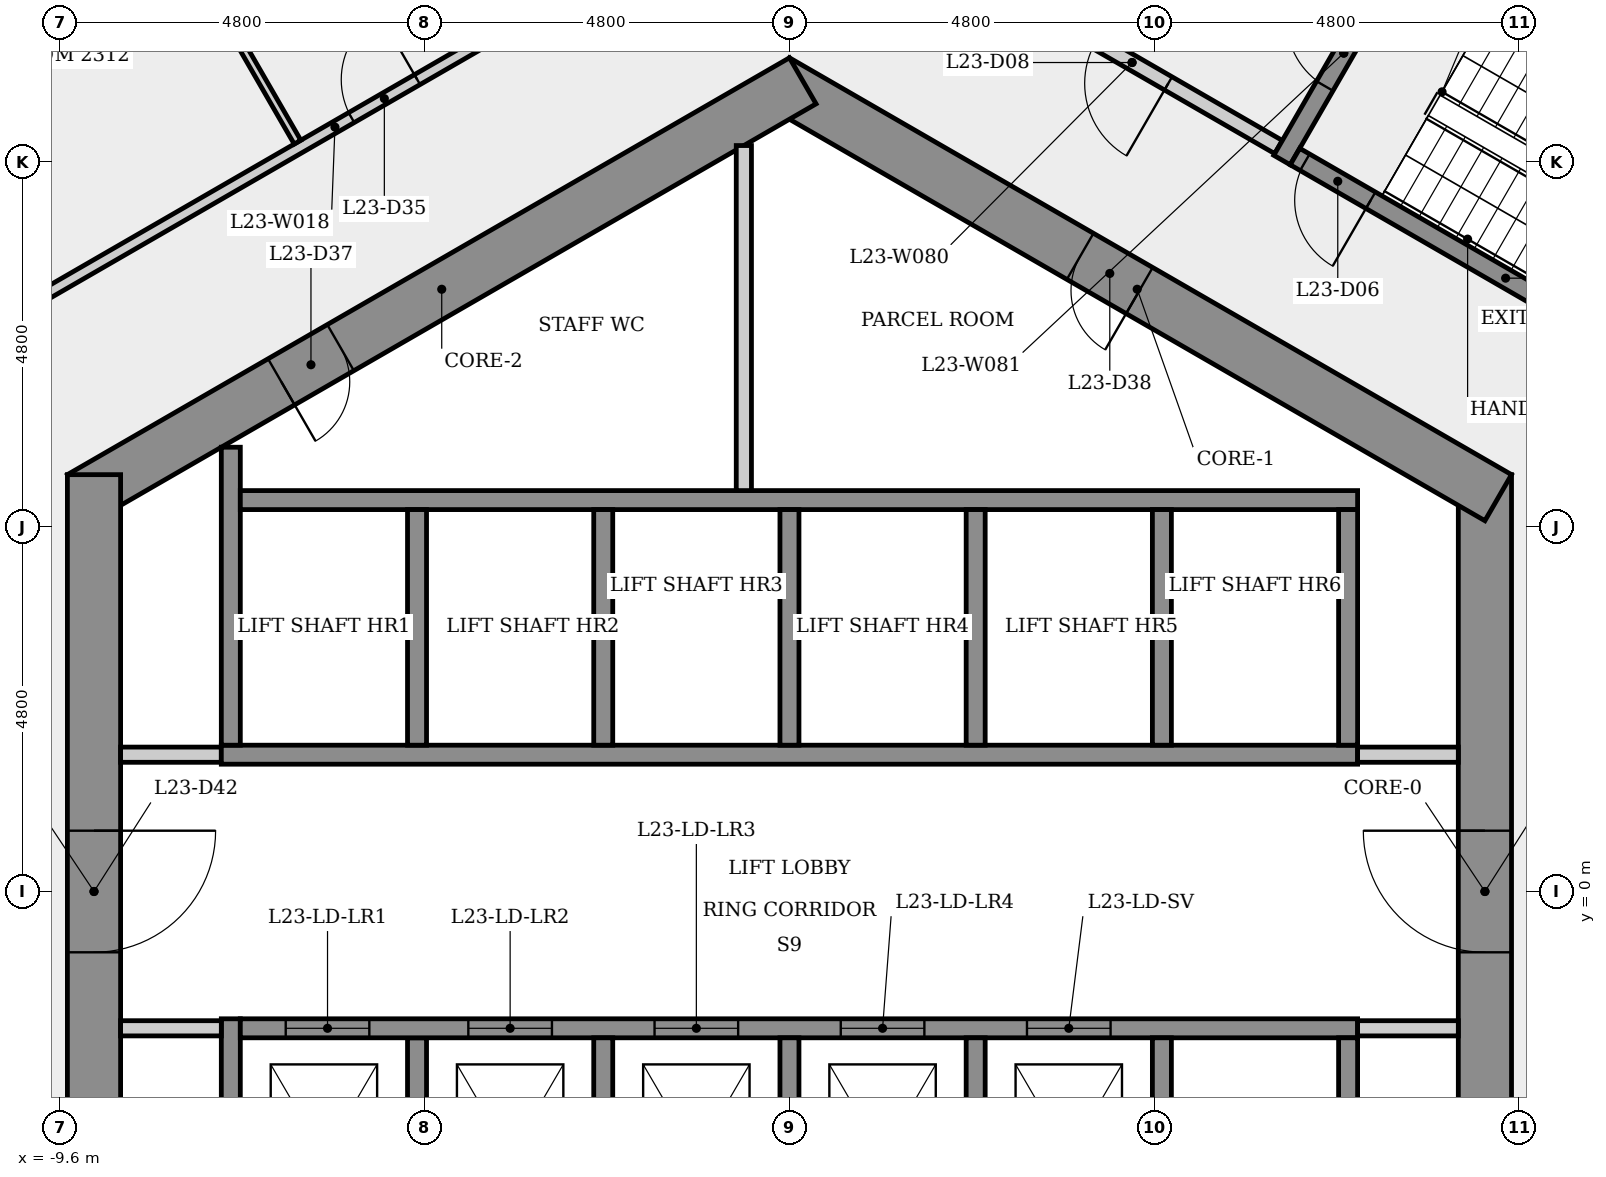
"""IFC4 building model, lengths in metres.
Left out: names, types, materials, properties, quantities, classifications, styles, units other than length and angle.
Written with IfcOpenShell. Run it as: python <this file> out.ifc"""

import sys

from ifc_helpers import new_model, si_unit, direction, frame, frame_2d, origin, place, context, subcontext, project, spatial, rectangle, extrude, element, fill, save


model = new_model("IFC4")
c1 = context("Model", 3, precision=1e-05, world=origin(), true_north=direction((0.0, 1.0)))
c2 = subcontext(c1, "Body", "Model", "MODEL_VIEW")
j1 = project(units=[si_unit("LENGTHUNIT", "METRE"), si_unit("PLANEANGLEUNIT", "RADIAN")], contexts=[c1])
p1 = place(None, origin())
s1 = spatial("IfcSite", under=j1, at=p1, CompositionType="ELEMENT")
p2 = place(p1, origin())
s2 = spatial("IfcBuilding", under=s1, at=p2, CompositionType="ELEMENT")
p3 = place(p2, frame((0.0, 0.0, 89.9)))
s3 = spatial("IfcBuildingStorey", under=s2, at=p3, CompositionType="ELEMENT", Elevation=89.9)
p4 = place(p3, frame((9.15, -5.485, 0.0), z_axis=(0.0, 0.0, 1.0), x_axis=(0.0, 1.0, 0.0)))
e1 = element("IfcWall", 1, at=p4, inside=s3, PredefinedType="SHEAR", context=c2, shape_type="SweptSolid", body=[
    extrude(rectangle(XDim=10.97, YDim=0.7, at=frame_2d((5.485, 0.0))), origin(), (0.0, 0.0, 1.0), 3.4),
])
p5 = place(p4, frame((4.685, 0.0, 0.0)))
e2 = element("IfcOpeningElement", 2, at=p5, cuts=e1, PredefinedType="OPENING", context=c2, shape_type="SweptSolid", body=[
    extrude(rectangle(XDim=1.6, YDim=2.1, at=frame_2d((0.8, 1.05))), frame((0.0, 0.36, 0.0), z_axis=(0.0, -1.0, 0.0), x_axis=(1.0, 0.0, 0.0)), (0.0, 0.0, 1.0), 0.72),
])
p6 = place(p3, frame((9.325, 5.182, 0.0), z_axis=(0.0, 0.0, 1.0), x_axis=(-0.866023993627, 0.500002442456, 0.0)))
e3 = element("IfcWall", 3, at=p6, inside=s3, PredefinedType="SHEAR", context=c2, shape_type="SweptSolid", body=[
    extrude(rectangle(XDim=10.97, YDim=0.7, at=frame_2d((5.485, 0.0))), origin(), (0.0, 0.0, 1.0), 3.4),
])
p7 = place(p6, frame((5.451, 0.0, 0.0)))
e4 = element("IfcOpeningElement", 4, at=p7, cuts=e3, PredefinedType="OPENING", context=c2, shape_type="SweptSolid", body=[
    extrude(rectangle(XDim=0.9, YDim=2.1, at=frame_2d((0.45, 1.05))), frame((0.0, 0.36, 0.0), z_axis=(0.0, -1.0, 0.0), x_axis=(1.0, 0.0, 0.0)), (0.0, 0.0, 1.0), 0.72),
])
p8 = place(p3, frame((0.175, 10.667, 0.0), z_axis=(0.0, 0.0, 1.0), x_axis=(-0.866023993627, -0.500002442456, 0.0)))
e5 = element("IfcWall", 5, at=p8, inside=s3, PredefinedType="SHEAR", context=c2, shape_type="SweptSolid", body=[
    extrude(rectangle(XDim=10.97, YDim=0.7, at=frame_2d((5.485, 0.0))), origin(), (0.0, 0.0, 1.0), 3.4),
])
p9 = place(p8, frame((7.021, 0.0, 0.0)))
e6 = element("IfcOpeningElement", 6, at=p9, cuts=e5, PredefinedType="OPENING", context=c2, shape_type="SweptSolid", body=[
    extrude(rectangle(XDim=0.9, YDim=2.1, at=frame_2d((0.45, 1.05))), frame((0.0, 0.36, 0.0), z_axis=(0.0, -1.0, 0.0), x_axis=(1.0, 0.0, 0.0)), (0.0, 0.0, 1.0), 0.72),
])
p10 = place(p3, frame((-9.15, 5.485, 0.0), z_axis=(0.0, 0.0, 1.0), x_axis=(0.0, -1.0, 0.0)))
e7 = element("IfcWall", 7, at=p10, inside=s3, PredefinedType="SHEAR", context=c2, shape_type="SweptSolid", body=[
    extrude(rectangle(XDim=10.97, YDim=0.7, at=frame_2d((5.485, 0.0))), origin(), (0.0, 0.0, 1.0), 3.4),
])
p11 = place(p10, frame((4.685, 0.0, 0.0)))
e8 = element("IfcOpeningElement", 8, at=p11, cuts=e7, PredefinedType="OPENING", context=c2, shape_type="SweptSolid", body=[
    extrude(rectangle(XDim=1.6, YDim=2.1, at=frame_2d((0.8, 1.05))), frame((0.0, 0.36, 0.0), z_axis=(0.0, -1.0, 0.0), x_axis=(1.0, 0.0, 0.0)), (0.0, 0.0, 1.0), 0.72),
])
p12 = place(p3, frame((-10.659, 7.356, 0.0), z_axis=(0.0, 0.0, 1.0), x_axis=(0.866022689903, 0.500004700551, 0.0)))
e9 = element("IfcWall", 9, at=p12, inside=s3, PredefinedType="PARTITIONING", context=c2, shape_type="SweptSolid", body=[
    extrude(rectangle(XDim=10.807, YDim=0.15, at=frame_2d((5.404, 0.0))), origin(), (0.0, 0.0, 1.0), 3.05),
])
p13 = place(p12, frame((5.654, 0.0, 0.0)))
e10 = element("IfcOpeningElement", 10, at=p13, cuts=e9, PredefinedType="OPENING", context=c2, shape_type="SweptSolid", body=[
    extrude(rectangle(XDim=1.0, YDim=2.1, at=frame_2d((0.5, 1.05))), frame((0.0, 0.085, 0.0), z_axis=(0.0, -1.0, 0.0), x_axis=(1.0, 0.0, 0.0)), (0.0, 0.0, 1.0), 0.17),
])
p14 = place(p3, frame((-8.8, 1.8, 0.0), z_axis=(0.0, 0.0, 1.0), x_axis=(1.0, 0.0, 0.0)))
e11 = element("IfcWall", 11, at=p14, inside=s3, PredefinedType="PARTITIONING", context=c2, shape_type="SweptSolid", body=[
    extrude(rectangle(XDim=1.325, YDim=0.2, at=frame_2d((0.663, 0.0))), origin(), (0.0, 0.0, 1.0), 3.05),
])
p15 = place(p3, frame((-7.475, 1.8, 0.0), z_axis=(0.0, 0.0, 1.0), x_axis=(1.0, 0.0, 0.0)))
e12 = element("IfcWall", 12, at=p15, inside=s3, PredefinedType="SHEAR", context=c2, shape_type="SweptSolid", body=[
    extrude(rectangle(XDim=14.95, YDim=0.25, at=frame_2d((7.475, 0.0))), origin(), (0.0, 0.0, 1.0), 3.05),
])
p16 = place(p3, frame((-7.35, -5.846, 0.0), z_axis=(0.0, 0.0, 1.0), x_axis=(0.0, 1.0, 0.0)))
e13 = element("IfcWall", 13, at=p16, inside=s3, PredefinedType="SHEAR", context=c2, shape_type="SweptSolid", body=[
    extrude(rectangle(XDim=4.171, YDim=0.25, at=frame_2d((2.085, 0.0))), origin(), (0.0, 0.0, 1.0), 3.05),
])
p17 = place(p3, frame((-7.35, 1.925, 0.0), z_axis=(0.0, 0.0, 1.0), x_axis=(0.0, 1.0, 0.0)))
e14 = element("IfcWall", 14, at=p17, inside=s3, PredefinedType="SHEAR", context=c2, shape_type="SweptSolid", body=[
    extrude(rectangle(XDim=3.921, YDim=0.25, at=frame_2d((1.96, 0.0))), origin(), (0.0, 0.0, 1.0), 3.05),
])
p18 = place(p3, frame((-7.225, 5.15, 0.0), z_axis=(0.0, 0.0, 1.0), x_axis=(1.0, 0.0, 0.0)))
e15 = element("IfcWall", 15, at=p18, inside=s3, PredefinedType="SHEAR", context=c2, shape_type="SweptSolid", body=[
    extrude(rectangle(XDim=14.7, YDim=0.25, at=frame_2d((7.35, 0.0))), origin(), (0.0, 0.0, 1.0), 3.05),
])
p19 = place(p3, frame((-7.475, -1.8, 0.0), z_axis=(0.0, 0.0, 1.0), x_axis=(-1.0, 0.0, 0.0)))
e16 = element("IfcWall", 16, at=p19, inside=s3, PredefinedType="PARTITIONING", context=c2, shape_type="SweptSolid", body=[
    extrude(rectangle(XDim=1.325, YDim=0.2, at=frame_2d((0.663, 0.0))), origin(), (0.0, 0.0, 1.0), 3.05),
])
p20 = place(p3, frame((-6.472, 9.86, 0.0), z_axis=(0.0, 0.0, 1.0), x_axis=(-0.499986033803, 0.866033467022, 0.0)))
e17 = element("IfcWall", 17, at=p20, inside=s3, PredefinedType="PARTITIONING", context=c2, shape_type="SweptSolid", body=[
    extrude(rectangle(XDim=8.232, YDim=0.1, at=frame_2d((4.116, 0.0))), origin(), (0.0, 0.0, 1.0), 3.05),
])
for number, where, z_axis, x_axis in (
    (18, (-4.9, -1.925, 0.0), (0.0, 0.0, 1.0), (0.0, -1.0, 0.0)),
    (19, (-4.9, 5.025, 0.0), (0.0, 0.0, 1.0), (0.0, -1.0, 0.0)),
):
    element("IfcWall", number, at=place(p3, frame(where, z_axis=z_axis, x_axis=x_axis)), inside=s3, PredefinedType="SHEAR", context=c2, shape_type="SweptSolid", body=[
        extrude(rectangle(XDim=3.1, YDim=0.25, at=frame_2d((1.55, 0.0))), origin(), (0.0, 0.0, 1.0), 3.4),
    ])
p21 = place(p3, frame((-7.225, -1.8, 0.0), z_axis=(0.0, 0.0, 1.0), x_axis=(1.0, 0.0, 0.0)))
e20 = element("IfcWall", 20, at=p21, inside=s3, PredefinedType="SHEAR", context=c2, shape_type="SweptSolid", body=[
    extrude(rectangle(XDim=14.7, YDim=0.25, at=frame_2d((7.35, 0.0))), origin(), (0.0, 0.0, 1.0), 3.05),
])
p22 = place(p21, frame((0.597, 0.0, 0.0)))
e21 = element("IfcOpeningElement", 21, at=p22, cuts=e20, PredefinedType="OPENING", context=c2, shape_type="SweptSolid", body=[
    extrude(rectangle(XDim=1.1, YDim=2.1, at=frame_2d((0.55, 1.05))), frame((0.0, 0.135, 0.0), z_axis=(0.0, -1.0, 0.0), x_axis=(1.0, 0.0, 0.0)), (0.0, 0.0, 1.0), 0.27),
])
p23 = place(p21, frame((3.0, 0.0, 0.0)))
e22 = element("IfcOpeningElement", 22, at=p23, cuts=e20, PredefinedType="OPENING", context=c2, shape_type="SweptSolid", body=[
    extrude(rectangle(XDim=1.1, YDim=2.1, at=frame_2d((0.55, 1.05))), frame((0.0, 0.135, 0.0), z_axis=(0.0, -1.0, 0.0), x_axis=(1.0, 0.0, 0.0)), (0.0, 0.0, 1.0), 0.27),
])
p24 = place(p21, frame((5.45, 0.0, 0.0)))
e23 = element("IfcOpeningElement", 23, at=p24, cuts=e20, PredefinedType="OPENING", context=c2, shape_type="SweptSolid", body=[
    extrude(rectangle(XDim=1.1, YDim=2.1, at=frame_2d((0.55, 1.05))), frame((0.0, 0.135, 0.0), z_axis=(0.0, -1.0, 0.0), x_axis=(1.0, 0.0, 0.0)), (0.0, 0.0, 1.0), 0.27),
])
p25 = place(p21, frame((7.9, 0.0, 0.0)))
e24 = element("IfcOpeningElement", 24, at=p25, cuts=e20, PredefinedType="OPENING", context=c2, shape_type="SweptSolid", body=[
    extrude(rectangle(XDim=1.1, YDim=2.1, at=frame_2d((0.55, 1.05))), frame((0.0, 0.135, 0.0), z_axis=(0.0, -1.0, 0.0), x_axis=(1.0, 0.0, 0.0)), (0.0, 0.0, 1.0), 0.27),
])
p26 = place(p21, frame((10.35, 0.0, 0.0)))
e25 = element("IfcOpeningElement", 25, at=p26, cuts=e20, PredefinedType="OPENING", context=c2, shape_type="SweptSolid", body=[
    extrude(rectangle(XDim=1.1, YDim=2.1, at=frame_2d((0.55, 1.05))), frame((0.0, 0.135, 0.0), z_axis=(0.0, -1.0, 0.0), x_axis=(1.0, 0.0, 0.0)), (0.0, 0.0, 1.0), 0.27),
])
for number, where, z_axis, x_axis in (
    (26, (-2.45, -1.925, 0.0), (0.0, 0.0, 1.0), (0.0, -1.0, 0.0)),
    (27, (-2.45, 5.025, 0.0), (0.0, 0.0, 1.0), (0.0, -1.0, 0.0)),
):
    element("IfcWall", number, at=place(p3, frame(where, z_axis=z_axis, x_axis=x_axis)), inside=s3, PredefinedType="SHEAR", context=c2, shape_type="SweptSolid", body=[
        extrude(rectangle(XDim=3.1, YDim=0.25, at=frame_2d((1.55, 0.0))), origin(), (0.0, 0.0, 1.0), 3.4),
    ])
p27 = place(p3, frame((-0.6, 9.815, 0.0), z_axis=(0.0, 0.0, 1.0), x_axis=(0.0, -1.0, 0.0)))
e28 = element("IfcWall", 28, at=p27, inside=s3, PredefinedType="PARTITIONING", context=c2, shape_type="SweptSolid", body=[
    extrude(rectangle(XDim=4.54, YDim=0.2, at=frame_2d((2.27, 0.0))), origin(), (0.0, 0.0, 1.0), 3.05),
])
for number, where, z_axis, x_axis in (
    (29, (0.0, -1.925, 0.0), (0.0, 0.0, 1.0), (0.0, -1.0, 0.0)),
    (30, (0.0, 5.025, 0.0), (0.0, 0.0, 1.0), (0.0, -1.0, 0.0)),
    (31, (2.45, -1.925, 0.0), (0.0, 0.0, 1.0), (0.0, -1.0, 0.0)),
    (32, (2.45, 5.025, 0.0), (0.0, 0.0, 1.0), (0.0, -1.0, 0.0)),
    (33, (4.9, -1.925, 0.0), (0.0, 0.0, 1.0), (0.0, -1.0, 0.0)),
    (34, (4.9, 5.025, 0.0), (0.0, 0.0, 1.0), (0.0, -1.0, 0.0)),
):
    element("IfcWall", number, at=place(p3, frame(where, z_axis=z_axis, x_axis=x_axis)), inside=s3, PredefinedType="SHEAR", context=c2, shape_type="SweptSolid", body=[
        extrude(rectangle(XDim=3.1, YDim=0.25, at=frame_2d((1.55, 0.0))), origin(), (0.0, 0.0, 1.0), 3.4),
    ])
p28 = place(p3, frame((6.435, 9.795, 0.0), z_axis=(0.0, 0.0, 1.0), x_axis=(-0.866012907634, 0.500021643343, 0.0)))
e35 = element("IfcWall", 35, at=p28, inside=s3, PredefinedType="PARTITIONING", context=c2, shape_type="SweptSolid", body=[
    extrude(rectangle(XDim=4.45, YDim=0.2, at=frame_2d((2.225, 0.0))), origin(), (0.0, 0.0, 1.0), 3.05),
])
p29 = place(p28, frame((1.675, 0.0, 0.0)))
e36 = element("IfcOpeningElement", 36, at=p29, cuts=e35, PredefinedType="OPENING", context=c2, shape_type="SweptSolid", body=[
    extrude(rectangle(XDim=1.1, YDim=2.1, at=frame_2d((0.55, 1.05))), frame((0.0, 0.11, 0.0), z_axis=(0.0, -1.0, 0.0), x_axis=(1.0, 0.0, 0.0)), (0.0, 0.0, 1.0), 0.22),
])
p30 = place(p3, frame((6.48, 9.624, 0.0), z_axis=(0.0, 0.0, 1.0), x_axis=(0.500017246033, 0.866015446554, 0.0)))
e37 = element("IfcWall", 37, at=p30, inside=s3, PredefinedType="SHEAR", context=c2, shape_type="SweptSolid", body=[
    extrude(rectangle(XDim=3.25, YDim=0.25, at=frame_2d((1.625, 0.0))), origin(), (0.0, 0.0, 1.0), 3.05),
])
p31 = place(p30, frame((1.125, 0.0, 0.0)))
e38 = element("IfcOpeningElement", 38, at=p31, cuts=e37, PredefinedType="OPENING", context=c2, shape_type="SweptSolid", body=[
    extrude(rectangle(XDim=1.0, YDim=2.1, at=frame_2d((0.5, 1.05))), frame((0.0, 0.135, 0.0), z_axis=(0.0, -1.0, 0.0), x_axis=(1.0, 0.0, 0.0)), (0.0, 0.0, 1.0), 0.27),
])
p32 = place(p3, frame((7.475, 1.8, 0.0), z_axis=(0.0, 0.0, 1.0), x_axis=(1.0, 0.0, 0.0)))
e39 = element("IfcWall", 39, at=p32, inside=s3, PredefinedType="PARTITIONING", context=c2, shape_type="SweptSolid", body=[
    extrude(rectangle(XDim=1.325, YDim=0.2, at=frame_2d((0.663, 0.0))), origin(), (0.0, 0.0, 1.0), 3.05),
])
for number, where, z_axis, x_axis in (
    (40, (7.35, -1.925, 0.0), (0.0, 0.0, 1.0), (0.0, -1.0, 0.0)),
    (41, (7.35, 5.025, 0.0), (0.0, 0.0, 1.0), (0.0, -1.0, 0.0)),
):
    element("IfcWall", number, at=place(p3, frame(where, z_axis=z_axis, x_axis=x_axis)), inside=s3, PredefinedType="SHEAR", context=c2, shape_type="SweptSolid", body=[
        extrude(rectangle(XDim=3.1, YDim=0.25, at=frame_2d((1.55, 0.0))), origin(), (0.0, 0.0, 1.0), 3.4),
    ])
p33 = place(p3, frame((8.151, 12.268, 0.0), z_axis=(0.0, 0.0, 1.0), x_axis=(0.866025499775, -0.499999833739, 0.0)))
e42 = element("IfcWall", 42, at=p33, inside=s3, PredefinedType="SHEAR", context=c2, shape_type="SweptSolid", body=[
    extrude(rectangle(XDim=6.4, YDim=0.25, at=frame_2d((3.2, 0.0))), origin(), (0.0, 0.0, 1.0), 3.05),
])
p34 = place(p3, frame((8.8, -1.8, 0.0), z_axis=(0.0, 0.0, 1.0), x_axis=(-1.0, 0.0, 0.0)))
e43 = element("IfcWall", 43, at=p34, inside=s3, PredefinedType="PARTITIONING", context=c2, shape_type="SweptSolid", body=[
    extrude(rectangle(XDim=1.325, YDim=0.2, at=frame_2d((0.663, 0.0))), origin(), (0.0, 0.0, 1.0), 3.05),
])
p35 = place(p3, frame((12.194, 6.47, 0.0), z_axis=(0.0, 0.0, 1.0), x_axis=(-0.866025499775, 0.499999833739, 0.0)))
e44 = element("IfcWall", 44, at=p35, inside=s3, PredefinedType="SHEAR", context=c2, shape_type="SweptSolid", body=[
    extrude(rectangle(XDim=6.4, YDim=0.25, at=frame_2d((3.2, 0.0))), origin(), (0.0, 0.0, 1.0), 3.05),
])
p36 = place(p35, frame((5.25, 0.0, 0.0)))
e45 = element("IfcOpeningElement", 45, at=p36, cuts=e44, PredefinedType="OPENING", context=c2, shape_type="SweptSolid", body=[
    extrude(rectangle(XDim=1.0, YDim=2.1, at=frame_2d((0.5, 1.05))), frame((0.0, 0.135, 0.0), z_axis=(0.0, -1.0, 0.0), x_axis=(1.0, 0.0, 0.0)), (0.0, 0.0, 1.0), 0.27),
])
p37 = place(p22, origin())
e46 = element("IfcDoor", 46, at=p37, inside=s3, OperationType="SLIDING_TO_LEFT", PredefinedType="DOOR", context=c2, shape_type="SweptSolid", body=[
    extrude(rectangle(XDim=1.1, YDim=2.1, at=frame_2d((0.55, 1.05))), frame((0.0, 0.025, 0.0), z_axis=(0.0, -1.0, 0.0), x_axis=(1.0, 0.0, 0.0)), (0.0, 0.0, 1.0), 0.05),
])
fill(e21, e46)
p38 = place(p23, origin())
e47 = element("IfcDoor", 47, at=p38, inside=s3, OperationType="SLIDING_TO_LEFT", PredefinedType="DOOR", context=c2, shape_type="SweptSolid", body=[
    extrude(rectangle(XDim=1.1, YDim=2.1, at=frame_2d((0.55, 1.05))), frame((0.0, 0.025, 0.0), z_axis=(0.0, -1.0, 0.0), x_axis=(1.0, 0.0, 0.0)), (0.0, 0.0, 1.0), 0.05),
])
fill(e22, e47)
p39 = place(p24, origin())
e48 = element("IfcDoor", 48, at=p39, inside=s3, OperationType="SLIDING_TO_LEFT", PredefinedType="DOOR", context=c2, shape_type="SweptSolid", body=[
    extrude(rectangle(XDim=1.1, YDim=2.1, at=frame_2d((0.55, 1.05))), frame((0.0, 0.025, 0.0), z_axis=(0.0, -1.0, 0.0), x_axis=(1.0, 0.0, 0.0)), (0.0, 0.0, 1.0), 0.05),
])
fill(e23, e48)
p40 = place(p25, origin())
e49 = element("IfcDoor", 49, at=p40, inside=s3, OperationType="SLIDING_TO_LEFT", PredefinedType="DOOR", context=c2, shape_type="SweptSolid", body=[
    extrude(rectangle(XDim=1.1, YDim=2.1, at=frame_2d((0.55, 1.05))), frame((0.0, 0.025, 0.0), z_axis=(0.0, -1.0, 0.0), x_axis=(1.0, 0.0, 0.0)), (0.0, 0.0, 1.0), 0.05),
])
fill(e24, e49)
p41 = place(p26, origin())
e50 = element("IfcDoor", 50, at=p41, inside=s3, OperationType="SLIDING_TO_LEFT", PredefinedType="DOOR", context=c2, shape_type="SweptSolid", body=[
    extrude(rectangle(XDim=1.1, YDim=2.1, at=frame_2d((0.55, 1.05))), frame((0.0, 0.025, 0.0), z_axis=(0.0, -1.0, 0.0), x_axis=(1.0, 0.0, 0.0)), (0.0, 0.0, 1.0), 0.05),
])
fill(e25, e50)
p42 = place(p36, origin())
e51 = element("IfcDoor", 51, at=p42, inside=s3, OperationType="SINGLE_SWING_LEFT", PredefinedType="DOOR", context=c2, shape_type="SweptSolid", body=[
    extrude(rectangle(XDim=1.0, YDim=2.1, at=frame_2d((0.5, 1.05))), frame((0.0, 0.025, 0.0), z_axis=(0.0, -1.0, 0.0), x_axis=(1.0, 0.0, 0.0)), (0.0, 0.0, 1.0), 0.05),
])
fill(e45, e51)
p43 = place(p31, origin())
e52 = element("IfcDoor", 52, at=p43, inside=s3, OperationType="SINGLE_SWING_RIGHT", PredefinedType="DOOR", context=c2, shape_type="SweptSolid", body=[
    extrude(rectangle(XDim=1.0, YDim=2.1, at=frame_2d((0.5, 1.05))), frame((0.0, 0.025, 0.0), z_axis=(0.0, -1.0, 0.0), x_axis=(1.0, 0.0, 0.0)), (0.0, 0.0, 1.0), 0.05),
])
fill(e38, e52)
p44 = place(p29, origin())
e53 = element("IfcDoor", 53, at=p44, inside=s3, OperationType="SINGLE_SWING_LEFT", PredefinedType="DOOR", context=c2, shape_type="SweptSolid", body=[
    extrude(rectangle(XDim=1.1, YDim=2.1, at=frame_2d((0.55, 1.05))), frame((0.0, 0.025, 0.0), z_axis=(0.0, -1.0, 0.0), x_axis=(1.0, 0.0, 0.0)), (0.0, 0.0, 1.0), 0.05),
])
fill(e36, e53)
p45 = place(p13, origin())
e54 = element("IfcDoor", 54, at=p45, inside=s3, OperationType="SINGLE_SWING_RIGHT", PredefinedType="DOOR", context=c2, shape_type="SweptSolid", body=[
    extrude(rectangle(XDim=1.0, YDim=2.1, at=frame_2d((0.5, 1.05))), frame((0.0, 0.025, 0.0), z_axis=(0.0, -1.0, 0.0), x_axis=(1.0, 0.0, 0.0)), (0.0, 0.0, 1.0), 0.05),
])
fill(e10, e54)
p46 = place(p9, origin())
e55 = element("IfcDoor", 55, at=p46, inside=s3, OperationType="SINGLE_SWING_RIGHT", PredefinedType="DOOR", context=c2, shape_type="SweptSolid", body=[
    extrude(rectangle(XDim=0.9, YDim=2.1, at=frame_2d((0.45, 1.05))), frame((0.0, 0.025, 0.0), z_axis=(0.0, -1.0, 0.0), x_axis=(1.0, 0.0, 0.0)), (0.0, 0.0, 1.0), 0.05),
])
fill(e6, e55)
p47 = place(p7, origin())
e56 = element("IfcDoor", 56, at=p47, inside=s3, OperationType="SINGLE_SWING_LEFT", PredefinedType="DOOR", context=c2, shape_type="SweptSolid", body=[
    extrude(rectangle(XDim=0.9, YDim=2.1, at=frame_2d((0.45, 1.05))), frame((0.0, 0.025, 0.0), z_axis=(0.0, -1.0, 0.0), x_axis=(1.0, 0.0, 0.0)), (0.0, 0.0, 1.0), 0.05),
])
fill(e4, e56)
p48 = place(p5, origin())
e57 = element("IfcDoor", 57, at=p48, inside=s3, OperationType="SINGLE_SWING_RIGHT", PredefinedType="DOOR", context=c2, shape_type="SweptSolid", body=[
    extrude(rectangle(XDim=1.6, YDim=2.1, at=frame_2d((0.8, 1.05))), frame((0.0, 0.025, 0.0), z_axis=(0.0, -1.0, 0.0), x_axis=(1.0, 0.0, 0.0)), (0.0, 0.0, 1.0), 0.05),
])
fill(e2, e57)
p49 = place(p11, origin())
e58 = element("IfcDoor", 58, at=p49, inside=s3, OperationType="SINGLE_SWING_LEFT", PredefinedType="DOOR", context=c2, shape_type="SweptSolid", body=[
    extrude(rectangle(XDim=1.6, YDim=2.1, at=frame_2d((0.8, 1.05))), frame((0.0, 0.025, 0.0), z_axis=(0.0, -1.0, 0.0), x_axis=(1.0, 0.0, 0.0)), (0.0, 0.0, 1.0), 0.05),
])
fill(e8, e58)
save(model, sys.argv[1])
